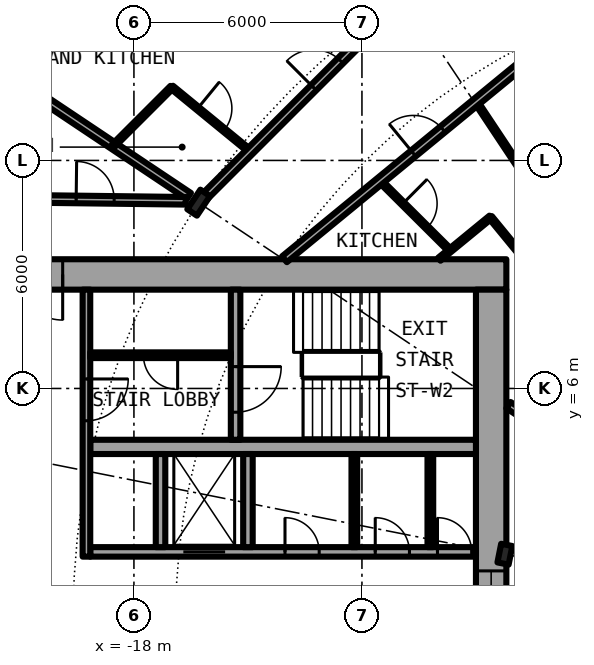
"""IFC4 building model, lengths in metres.
Left out: names, types, materials, properties, quantities, classifications, styles, units other than length and angle.
Written with IfcOpenShell. Run it as: python <this file> out.ifc"""

import sys

from ifc_helpers import new_model, si_unit, direction, frame, frame_2d, origin, origin_2d, place, context, subcontext, project, spatial, rectangle, i_section, extrude, element, fill, save


model = new_model("IFC4")
c1 = context("Model", 3, precision=1e-05, world=origin(), true_north=direction((0.0, 1.0)))
c2 = subcontext(c1, "Body", "Model", "MODEL_VIEW")
j1 = project(units=[si_unit("LENGTHUNIT", "METRE"), si_unit("PLANEANGLEUNIT", "RADIAN")], contexts=[c1])
p1 = place(None, origin())
s1 = spatial("IfcSite", under=j1, at=p1, CompositionType="ELEMENT")
p2 = place(p1, origin())
s2 = spatial("IfcBuilding", under=s1, at=p2, CompositionType="ELEMENT")
p3 = place(p2, frame((0.0, 0.0, 41.1)))
s3 = spatial("IfcBuildingStorey", under=s2, at=p3, CompositionType="ELEMENT", Elevation=41.1)
p4 = place(p3, frame((-16.297, 10.889, 0.0), z_axis=(0.0, 0.0, 1.0), x_axis=(-0.831469612303, 0.55557023302, 0.0)))
e1 = element("IfcColumn", 1, at=p4, inside=s3, PredefinedType="COLUMN", context=c2, shape_type="SweptSolid", body=[
    extrude(i_section(OverallWidth=0.305, OverallDepth=0.62, WebThickness=0.021, FlangeThickness=0.04, FilletRadius=0.027, at=origin_2d()), origin(), (0.0, 0.0, 1.0), 3.05),
])
p5 = place(p3, frame((-8.239, 1.639, 0.0), z_axis=(0.0, 0.0, 1.0), x_axis=(-0.980785280403, 0.195090322016, 0.0)))
e2 = element("IfcColumn", 2, at=p5, inside=s3, PredefinedType="COLUMN", context=c2, shape_type="SweptSolid", body=[
    extrude(i_section(OverallWidth=0.3, OverallDepth=0.5, WebThickness=0.014, FlangeThickness=0.028, FilletRadius=0.027, at=origin_2d()), origin(), (0.0, 0.0, 1.0), 3.05),
])
p6 = place(p3, frame((-8.2, 9.0, 0.0), z_axis=(0.0, 0.0, 1.0), x_axis=(-1.0, 0.0, 0.0)))
e3 = element("IfcWall", 3, at=p6, inside=s3, PredefinedType="SHEAR", context=c2, shape_type="SweptSolid", body=[
    extrude(rectangle(XDim=14.2, YDim=0.8, at=frame_2d((7.1, 0.0))), origin(), (0.0, 0.0, 1.0), 3.05),
])
p7 = place(p6, frame((11.675, 0.0, 0.0)))
e4 = element("IfcOpeningElement", 4, at=p7, cuts=e3, PredefinedType="OPENING", context=c2, shape_type="SweptSolid", body=[
    extrude(rectangle(XDim=1.2, YDim=2.3, at=frame_2d((0.6, 1.15))), frame((0.0, 0.41, 0.0), z_axis=(0.0, -1.0, 0.0), x_axis=(1.0, 0.0, 0.0)), (0.0, 0.0, 1.0), 0.82),
])
p8 = place(p3, frame((-8.6, 8.6, 0.0), z_axis=(0.0, 0.0, 1.0), x_axis=(0.0, -1.0, 0.0)))
e5 = element("IfcWall", 5, at=p8, inside=s3, PredefinedType="SHEAR", context=c2, shape_type="SweptSolid", body=[
    extrude(rectangle(XDim=17.2, YDim=0.8, at=frame_2d((8.6, 0.0))), origin(), (0.0, 0.0, 1.0), 3.05),
])
p9 = place(p8, frame((7.4, 0.0, 0.1)))
e6 = element("IfcOpeningElement", 6, at=p9, cuts=e5, PredefinedType="OPENING", context=c2, shape_type="SweptSolid", body=[
    extrude(rectangle(XDim=2.4, YDim=2.2, at=frame_2d((1.2, 1.1))), frame((0.0, 0.41, 0.0), z_axis=(0.0, -1.0, 0.0), x_axis=(1.0, 0.0, 0.0)), (0.0, 0.0, 1.0), 0.82),
])
p10 = place(p3, frame((-19.15, 1.7, 0.0), z_axis=(0.0, 0.0, 1.0), x_axis=(1.0, 0.0, 0.0)))
e7 = element("IfcWall", 7, at=p10, inside=s3, PredefinedType="SHEAR", context=c2, shape_type="SweptSolid", body=[
    extrude(rectangle(XDim=10.15, YDim=0.25, at=frame_2d((5.075, 0.0))), origin(), (0.0, 0.0, 1.0), 3.05),
])
p11 = place(p10, frame((2.45, 0.0, 0.0)))
e8 = element("IfcOpeningElement", 8, at=p11, cuts=e7, PredefinedType="OPENING", context=c2, shape_type="SweptSolid", body=[
    extrude(rectangle(XDim=1.1, YDim=2.3, at=frame_2d((0.55, 1.15))), frame((0.0, 0.135, 0.0), z_axis=(0.0, -1.0, 0.0), x_axis=(1.0, 0.0, 0.0)), (0.0, 0.0, 1.0), 0.27),
])
p12 = place(p10, frame((9.137, 0.0, 0.0)))
e9 = element("IfcOpeningElement", 9, at=p12, cuts=e7, PredefinedType="OPENING", context=c2, shape_type="SweptSolid", body=[
    extrude(rectangle(XDim=0.9, YDim=2.3, at=frame_2d((0.45, 1.15))), frame((0.0, 0.135, 0.0), z_axis=(0.0, -1.0, 0.0), x_axis=(1.0, 0.0, 0.0)), (0.0, 0.0, 1.0), 0.27),
])
p13 = place(p10, frame((7.5, 0.0, 0.0)))
e10 = element("IfcOpeningElement", 10, at=p13, cuts=e7, PredefinedType="OPENING", context=c2, shape_type="SweptSolid", body=[
    extrude(rectangle(XDim=0.9, YDim=2.3, at=frame_2d((0.45, 1.15))), frame((0.0, 0.135, 0.0), z_axis=(0.0, -1.0, 0.0), x_axis=(1.0, 0.0, 0.0)), (0.0, 0.0, 1.0), 0.27),
])
p14 = place(p10, frame((5.125, 0.0, 0.0)))
e11 = element("IfcOpeningElement", 11, at=p14, cuts=e7, PredefinedType="OPENING", context=c2, shape_type="SweptSolid", body=[
    extrude(rectangle(XDim=0.9, YDim=2.3, at=frame_2d((0.45, 1.15))), frame((0.0, 0.135, 0.0), z_axis=(0.0, -1.0, 0.0), x_axis=(1.0, 0.0, 0.0)), (0.0, 0.0, 1.0), 0.27),
])
p15 = place(p3, frame((-9.0, 4.462, 0.0), z_axis=(0.0, 0.0, 1.0), x_axis=(-1.0, 0.0, 0.0)))
e12 = element("IfcWall", 12, at=p15, inside=s3, PredefinedType="SHEAR", context=c2, shape_type="SweptSolid", body=[
    extrude(rectangle(XDim=10.15, YDim=0.375, at=frame_2d((5.075, 0.0))), origin(), (0.0, 0.0, 1.0), 3.05),
])
p16 = place(p3, frame((-15.325, 8.6, 0.0), z_axis=(0.0, 0.0, 1.0), x_axis=(0.0, -1.0, 0.0)))
e13 = element("IfcWall", 13, at=p16, inside=s3, PredefinedType="SHEAR", context=c2, shape_type="SweptSolid", body=[
    extrude(rectangle(XDim=3.95, YDim=0.25, at=frame_2d((1.975, 0.0))), origin(), (0.0, 0.0, 1.0), 3.05),
])
p17 = place(p16, frame((2.025, 0.0, 0.0)))
e14 = element("IfcOpeningElement", 14, at=p17, cuts=e13, PredefinedType="OPENING", context=c2, shape_type="SweptSolid", body=[
    extrude(rectangle(XDim=1.2, YDim=2.3, at=frame_2d((0.6, 1.15))), frame((0.0, 0.135, 0.0), z_axis=(0.0, -1.0, 0.0), x_axis=(1.0, 0.0, 0.0)), (0.0, 0.0, 1.0), 0.27),
])
for number, where, z_axis, x_axis in (
    (15, (-15.0, 1.825, 0.0), (0.0, 0.0, 1.0), (0.0, 1.0, 0.0)),
    (16, (-17.3, 1.825, 0.0), (0.0, 0.0, 1.0), (0.0, 1.0, 0.0)),
):
    element("IfcWall", number, at=place(p3, frame(where, z_axis=z_axis, x_axis=x_axis)), inside=s3, PredefinedType="SOLIDWALL", context=c2, shape_type="SweptSolid", body=[
        extrude(rectangle(XDim=2.45, YDim=0.25, at=frame_2d((1.225, 0.0))), origin(), (0.0, 0.0, 1.0), 2.7),
    ])
p18 = place(p3, frame((-19.25, 8.6, 0.0), z_axis=(0.0, 0.0, 1.0), x_axis=(0.0, -1.0, 0.0)))
e17 = element("IfcWall", 17, at=p18, inside=s3, PredefinedType="SOLIDWALL", context=c2, shape_type="SweptSolid", body=[
    extrude(rectangle(XDim=7.025, YDim=0.2, at=frame_2d((3.513, 0.0))), origin(), (0.0, 0.0, 1.0), 2.7),
])
p19 = place(p18, frame((2.35, 0.0, 0.0)))
e18 = element("IfcOpeningElement", 18, at=p19, cuts=e17, PredefinedType="OPENING", context=c2, shape_type="SweptSolid", body=[
    extrude(rectangle(XDim=1.1, YDim=2.3, at=frame_2d((0.55, 1.15))), frame((0.0, 0.11, 0.0), z_axis=(0.0, -1.0, 0.0), x_axis=(1.0, 0.0, 0.0)), (0.0, 0.0, 1.0), 0.22),
])
for number, where, z_axis, x_axis in (
    (19, (-10.2, 1.825, 0.0), (0.0, 0.0, 1.0), (0.0, 1.0, 0.0)),
    (20, (-12.2, 1.825, 0.0), (0.0, 0.0, 1.0), (0.0, 1.0, 0.0)),
):
    element("IfcWall", number, at=place(p3, frame(where, z_axis=z_axis, x_axis=x_axis)), inside=s3, PredefinedType="PARTITIONING", context=c2, shape_type="SweptSolid", body=[
        extrude(rectangle(XDim=2.45, YDim=0.15, at=frame_2d((1.225, 0.0))), origin(), (0.0, 0.0, 1.0), 2.7),
    ])
p20 = place(p3, frame((-15.45, 6.875, 0.0), z_axis=(0.0, 0.0, 1.0), x_axis=(-1.0, 0.0, 0.0)))
e21 = element("IfcWall", 21, at=p20, inside=s3, PredefinedType="PARTITIONING", context=c2, shape_type="SweptSolid", body=[
    extrude(rectangle(XDim=3.7, YDim=0.15, at=frame_2d((1.85, 0.0))), origin(), (0.0, 0.0, 1.0), 2.7),
])
p21 = place(p20, frame((1.4, 0.0, 0.0)))
e22 = element("IfcOpeningElement", 22, at=p21, cuts=e21, PredefinedType="OPENING", context=c2, shape_type="SweptSolid", body=[
    extrude(rectangle(XDim=0.9, YDim=2.3, at=frame_2d((0.45, 1.15))), frame((0.0, 0.085, 0.0), z_axis=(0.0, -1.0, 0.0), x_axis=(1.0, 0.0, 0.0)), (0.0, 0.0, 1.0), 0.17),
])
p22 = place(p3, frame((-22.595, 15.097, 0.0), z_axis=(0.0, 0.0, 1.0), x_axis=(0.831465568067, -0.555576285599, 0.0)))
e23 = element("IfcWall", 23, at=p22, inside=s3, PredefinedType="PARTITIONING", context=c2, shape_type="SweptSolid", body=[
    extrude(rectangle(XDim=7.264, YDim=0.2, at=frame_2d((3.632, 0.0))), origin(), (0.0, 0.0, 1.0), 2.7),
])
p23 = place(p3, frame((-17.004, 13.927, 0.0), z_axis=(0.0, 0.0, 1.0), x_axis=(0.77367517848, -0.633582447834, 0.0)))
e24 = element("IfcWall", 24, at=p23, inside=s3, PredefinedType="PARTITIONING", context=c2, shape_type="SweptSolid", body=[
    extrude(rectangle(XDim=2.661, YDim=0.1, at=frame_2d((1.331, 0.0))), origin(), (0.0, 0.0, 1.0), 2.7),
])
p24 = place(p23, frame((0.881, 0.0, 0.0)))
e25 = element("IfcOpeningElement", 25, at=p24, cuts=e24, PredefinedType="OPENING", context=c2, shape_type="SweptSolid", body=[
    extrude(rectangle(XDim=0.9, YDim=2.3, at=frame_2d((0.45, 1.15))), frame((0.0, 0.06, 0.0), z_axis=(0.0, -1.0, 0.0), x_axis=(1.0, 0.0, 0.0)), (0.0, 0.0, 1.0), 0.12),
])
p25 = place(p3, frame((-11.524, 11.464, 0.0), z_axis=(0.0, 0.0, 1.0), x_axis=(0.708796844581, -0.705412668665, 0.0)))
e26 = element("IfcWall", 26, at=p25, inside=s3, PredefinedType="PARTITIONING", context=c2, shape_type="SweptSolid", body=[
    extrude(rectangle(XDim=2.597, YDim=0.1, at=frame_2d((1.299, 0.0))), origin(), (0.0, 0.0, 1.0), 2.7),
])
p26 = place(p25, frame((0.849, 0.0, 0.0)))
e27 = element("IfcOpeningElement", 27, at=p26, cuts=e26, PredefinedType="OPENING", context=c2, shape_type="SweptSolid", body=[
    extrude(rectangle(XDim=0.9, YDim=2.3, at=frame_2d((0.45, 1.15))), frame((0.0, 0.06, 0.0), z_axis=(0.0, -1.0, 0.0), x_axis=(1.0, 0.0, 0.0)), (0.0, 0.0, 1.0), 0.12),
])
p27 = place(p3, frame((-8.996, 13.539, 0.0), z_axis=(0.0, 0.0, 1.0), x_axis=(0.553615197403, -0.83277260594, 0.0)))
e28 = element("IfcWall", 28, at=p27, inside=s3, PredefinedType="PARTITIONING", context=c2, shape_type="SweptSolid", body=[
    extrude(rectangle(XDim=2.597, YDim=0.1, at=frame_2d((1.299, 0.0))), origin(), (0.0, 0.0, 1.0), 2.7),
])
p28 = place(p3, frame((-8.62, 10.504, 0.0), z_axis=(0.0, 0.0, 1.0), x_axis=(0.634358693064, -0.773038840249, 0.0)))
e29 = element("IfcWall", 29, at=p28, inside=s3, PredefinedType="PARTITIONING", context=c2, shape_type="SweptSolid", body=[
    extrude(rectangle(XDim=5.868, YDim=0.1, at=frame_2d((2.934, 0.0))), origin(), (0.0, 0.0, 1.0), 2.7),
])
p29 = place(p28, frame((2.484, 0.0, 0.0)))
e30 = element("IfcOpeningElement", 30, at=p29, cuts=e29, PredefinedType="OPENING", context=c2, shape_type="SweptSolid", body=[
    extrude(rectangle(XDim=0.9, YDim=2.3, at=frame_2d((0.45, 1.15))), frame((0.0, 0.06, 0.0), z_axis=(0.0, -1.0, 0.0), x_axis=(1.0, 0.0, 0.0)), (0.0, 0.0, 1.0), 0.12),
])
p30 = place(p3, frame((-6.513, 4.472, 0.0), z_axis=(0.0, 0.0, 1.0), x_axis=(-0.831417956244, 0.555647533996, 0.0)))
e31 = element("IfcWall", 31, at=p30, inside=s3, PredefinedType="PARTITIONING", context=c2, shape_type="SweptSolid", body=[
    extrude(rectangle(XDim=1.962, YDim=0.2, at=frame_2d((0.981, 0.0))), origin(), (0.0, 0.0, 1.0), 2.7),
])
p31 = place(p3, frame((-21.675, 11.0, 0.0), z_axis=(0.0, 0.0, 1.0), x_axis=(0.99992425795, -0.012307654658, 0.0)))
e32 = element("IfcWall", 32, at=p31, inside=s3, PredefinedType="PARTITIONING", context=c2, shape_type="SweptSolid", body=[
    extrude(rectangle(XDim=5.039, YDim=0.2, at=frame_2d((2.519, 0.0))), origin(), (0.0, 0.0, 1.0), 2.7),
])
p32 = place(p31, frame((2.155, 0.0, 0.0)))
e33 = element("IfcOpeningElement", 33, at=p32, cuts=e32, PredefinedType="OPENING", context=c2, shape_type="SweptSolid", body=[
    extrude(rectangle(XDim=1.0, YDim=2.3, at=frame_2d((0.5, 1.15))), frame((0.0, 0.11, 0.0), z_axis=(0.0, -1.0, 0.0), x_axis=(1.0, 0.0, 0.0)), (0.0, 0.0, 1.0), 0.22),
])
p33 = place(p3, frame((-9.965, 9.4, 0.0), z_axis=(0.0, 0.0, 1.0), x_axis=(0.773141825369, 0.634233173104, 0.0)))
e34 = element("IfcWall", 34, at=p33, inside=s3, PredefinedType="PARTITIONING", context=c2, shape_type="SweptSolid", body=[
    extrude(rectangle(XDim=1.749, YDim=0.1, at=frame_2d((0.875, 0.0))), origin(), (0.0, 0.0, 1.0), 2.7),
])
p34 = place(p3, frame((-14.039, 9.4, 0.0), z_axis=(0.0, 0.0, 1.0), x_axis=(0.77298340166, 0.634426245326, 0.0)))
e35 = element("IfcWall", 35, at=p34, inside=s3, PredefinedType="PARTITIONING", context=c2, shape_type="SweptSolid", body=[
    extrude(rectangle(XDim=9.793, YDim=0.2, at=frame_2d((4.896, 0.0))), origin(), (0.0, 0.0, 1.0), 2.7),
])
p35 = place(p34, frame((4.389, 0.0, 0.0)))
e36 = element("IfcOpeningElement", 36, at=p35, cuts=e35, PredefinedType="OPENING", context=c2, shape_type="SweptSolid", body=[
    extrude(rectangle(XDim=1.0, YDim=2.3, at=frame_2d((0.5, 1.15))), frame((0.0, 0.11, 0.0), z_axis=(0.0, -1.0, 0.0), x_axis=(1.0, 0.0, 0.0)), (0.0, 0.0, 1.0), 0.22),
])
p36 = place(p3, frame((-16.187, 10.999, 0.0), z_axis=(0.0, 0.0, 1.0), x_axis=(0.707106781187, 0.707106781187, 0.0)))
e37 = element("IfcWall", 37, at=p36, inside=s3, PredefinedType="PARTITIONING", context=c2, shape_type="SweptSolid", body=[
    extrude(rectangle(XDim=7.337, YDim=0.2, at=frame_2d((3.668, 0.0))), origin(), (0.0, 0.0, 1.0), 2.38),
])
p37 = place(p36, frame((4.124, 0.0, 0.0)))
e38 = element("IfcOpeningElement", 38, at=p37, cuts=e37, PredefinedType="OPENING", context=c2, shape_type="SweptSolid", body=[
    extrude(rectangle(XDim=1.0, YDim=2.3, at=frame_2d((0.5, 1.15))), frame((0.0, 0.11, 0.0), z_axis=(0.0, -1.0, 0.0), x_axis=(1.0, 0.0, 0.0)), (0.0, 0.0, 1.0), 0.22),
])
p38 = place(p3, frame((-18.542, 12.389, 0.0), z_axis=(0.0, 0.0, 1.0), x_axis=(0.707106781187, 0.707106781187, 0.0)))
e39 = element("IfcWall", 39, at=p38, inside=s3, PredefinedType="PARTITIONING", context=c2, shape_type="SweptSolid", body=[
    extrude(rectangle(XDim=2.175, YDim=0.1, at=frame_2d((1.088, 0.0))), origin(), (0.0, 0.0, 1.0), 2.7),
])
p39 = place(p11, origin())
e40 = element("IfcDoor", 40, at=p39, inside=s3, OperationType="DOUBLE_DOOR_SLIDING", PredefinedType="DOOR", context=c2, shape_type="SweptSolid", body=[
    extrude(rectangle(XDim=1.1, YDim=2.3, at=frame_2d((0.55, 1.15))), frame((0.0, 0.025, 0.0), z_axis=(0.0, -1.0, 0.0), x_axis=(1.0, 0.0, 0.0)), (0.0, 0.0, 1.0), 0.05),
])
fill(e8, e40)
p40 = place(p12, origin())
e41 = element("IfcDoor", 41, at=p40, inside=s3, OperationType="SINGLE_SWING_LEFT", PredefinedType="DOOR", context=c2, shape_type="SweptSolid", body=[
    extrude(rectangle(XDim=0.9, YDim=2.3, at=frame_2d((0.45, 1.15))), frame((0.0, 0.025, 0.0), z_axis=(0.0, -1.0, 0.0), x_axis=(1.0, 0.0, 0.0)), (0.0, 0.0, 1.0), 0.05),
])
fill(e9, e41)
p41 = place(p13, origin())
e42 = element("IfcDoor", 42, at=p41, inside=s3, OperationType="SINGLE_SWING_LEFT", PredefinedType="DOOR", context=c2, shape_type="SweptSolid", body=[
    extrude(rectangle(XDim=0.9, YDim=2.3, at=frame_2d((0.45, 1.15))), frame((0.0, 0.025, 0.0), z_axis=(0.0, -1.0, 0.0), x_axis=(1.0, 0.0, 0.0)), (0.0, 0.0, 1.0), 0.05),
])
fill(e10, e42)
p42 = place(p14, origin())
e43 = element("IfcDoor", 43, at=p42, inside=s3, OperationType="SINGLE_SWING_LEFT", PredefinedType="DOOR", context=c2, shape_type="SweptSolid", body=[
    extrude(rectangle(XDim=0.9, YDim=2.3, at=frame_2d((0.45, 1.15))), frame((0.0, 0.025, 0.0), z_axis=(0.0, -1.0, 0.0), x_axis=(1.0, 0.0, 0.0)), (0.0, 0.0, 1.0), 0.05),
])
fill(e11, e43)
p43 = place(p21, origin())
e44 = element("IfcDoor", 44, at=p43, inside=s3, OperationType="SINGLE_SWING_LEFT", PredefinedType="DOOR", context=c2, shape_type="SweptSolid", body=[
    extrude(rectangle(XDim=0.9, YDim=2.3, at=frame_2d((0.45, 1.15))), frame((0.0, 0.025, 0.0), z_axis=(0.0, -1.0, 0.0), x_axis=(1.0, 0.0, 0.0)), (0.0, 0.0, 1.0), 0.05),
])
fill(e22, e44)
p44 = place(p17, origin())
e45 = element("IfcDoor", 45, at=p44, inside=s3, OperationType="SINGLE_SWING_LEFT", PredefinedType="DOOR", context=c2, shape_type="SweptSolid", body=[
    extrude(rectangle(XDim=1.2, YDim=2.3, at=frame_2d((0.6, 1.15))), frame((0.0, 0.025, 0.0), z_axis=(0.0, -1.0, 0.0), x_axis=(1.0, 0.0, 0.0)), (0.0, 0.0, 1.0), 0.05),
])
fill(e14, e45)
p45 = place(p19, origin())
e46 = element("IfcDoor", 46, at=p45, inside=s3, OperationType="SINGLE_SWING_RIGHT", PredefinedType="DOOR", context=c2, shape_type="SweptSolid", body=[
    extrude(rectangle(XDim=1.1, YDim=2.3, at=frame_2d((0.55, 1.15))), frame((0.0, 0.025, 0.0), z_axis=(0.0, -1.0, 0.0), x_axis=(1.0, 0.0, 0.0)), (0.0, 0.0, 1.0), 0.05),
])
fill(e18, e46)
p46 = place(p7, origin())
e47 = element("IfcDoor", 47, at=p46, inside=s3, OperationType="SINGLE_SWING_LEFT", PredefinedType="DOOR", context=c2, shape_type="SweptSolid", body=[
    extrude(rectangle(XDim=1.2, YDim=2.3, at=frame_2d((0.6, 1.15))), frame((0.0, 0.025, 0.0), z_axis=(0.0, -1.0, 0.0), x_axis=(1.0, 0.0, 0.0)), (0.0, 0.0, 1.0), 0.05),
])
fill(e4, e47)
p47 = place(p9, origin())
e48 = element("IfcWindow", 48, at=p47, inside=s3, PartitioningType="SINGLE_PANEL", PredefinedType="WINDOW", context=c2, shape_type="SweptSolid", body=[
    extrude(rectangle(XDim=2.4, YDim=2.2, at=frame_2d((1.2, 1.1))), frame((0.0, 0.03, 0.0), z_axis=(0.0, -1.0, 0.0), x_axis=(1.0, 0.0, 0.0)), (0.0, 0.0, 1.0), 0.06),
])
fill(e6, e48)
p48 = place(p37, origin())
e49 = element("IfcDoor", 49, at=p48, inside=s3, OperationType="SINGLE_SWING_RIGHT", PredefinedType="DOOR", context=c2, shape_type="SweptSolid", body=[
    extrude(rectangle(XDim=1.0, YDim=2.3, at=frame_2d((0.5, 1.15))), frame((0.0, 0.025, 0.0), z_axis=(0.0, -1.0, 0.0), x_axis=(1.0, 0.0, 0.0)), (0.0, 0.0, 1.0), 0.05),
])
fill(e38, e49)
p49 = place(p24, origin())
e50 = element("IfcDoor", 50, at=p49, inside=s3, OperationType="SINGLE_SWING_RIGHT", PredefinedType="DOOR", context=c2, shape_type="SweptSolid", body=[
    extrude(rectangle(XDim=0.9, YDim=2.3, at=frame_2d((0.45, 1.15))), frame((0.0, 0.025, 0.0), z_axis=(0.0, -1.0, 0.0), x_axis=(1.0, 0.0, 0.0)), (0.0, 0.0, 1.0), 0.05),
])
fill(e25, e50)
p50 = place(p35, origin())
e51 = element("IfcDoor", 51, at=p50, inside=s3, OperationType="SINGLE_SWING_LEFT", PredefinedType="DOOR", context=c2, shape_type="SweptSolid", body=[
    extrude(rectangle(XDim=1.0, YDim=2.3, at=frame_2d((0.5, 1.15))), frame((0.0, 0.025, 0.0), z_axis=(0.0, -1.0, 0.0), x_axis=(1.0, 0.0, 0.0)), (0.0, 0.0, 1.0), 0.05),
])
fill(e36, e51)
p51 = place(p26, origin())
e52 = element("IfcDoor", 52, at=p51, inside=s3, OperationType="SINGLE_SWING_RIGHT", PredefinedType="DOOR", context=c2, shape_type="SweptSolid", body=[
    extrude(rectangle(XDim=0.9, YDim=2.3, at=frame_2d((0.45, 1.15))), frame((0.0, 0.025, 0.0), z_axis=(0.0, -1.0, 0.0), x_axis=(1.0, 0.0, 0.0)), (0.0, 0.0, 1.0), 0.05),
])
fill(e27, e52)
p52 = place(p32, origin())
e53 = element("IfcDoor", 53, at=p52, inside=s3, OperationType="SINGLE_SWING_RIGHT", PredefinedType="DOOR", context=c2, shape_type="SweptSolid", body=[
    extrude(rectangle(XDim=1.0, YDim=2.3, at=frame_2d((0.5, 1.15))), frame((0.0, 0.025, 0.0), z_axis=(0.0, -1.0, 0.0), x_axis=(1.0, 0.0, 0.0)), (0.0, 0.0, 1.0), 0.05),
])
fill(e33, e53)
save(model, sys.argv[1])
